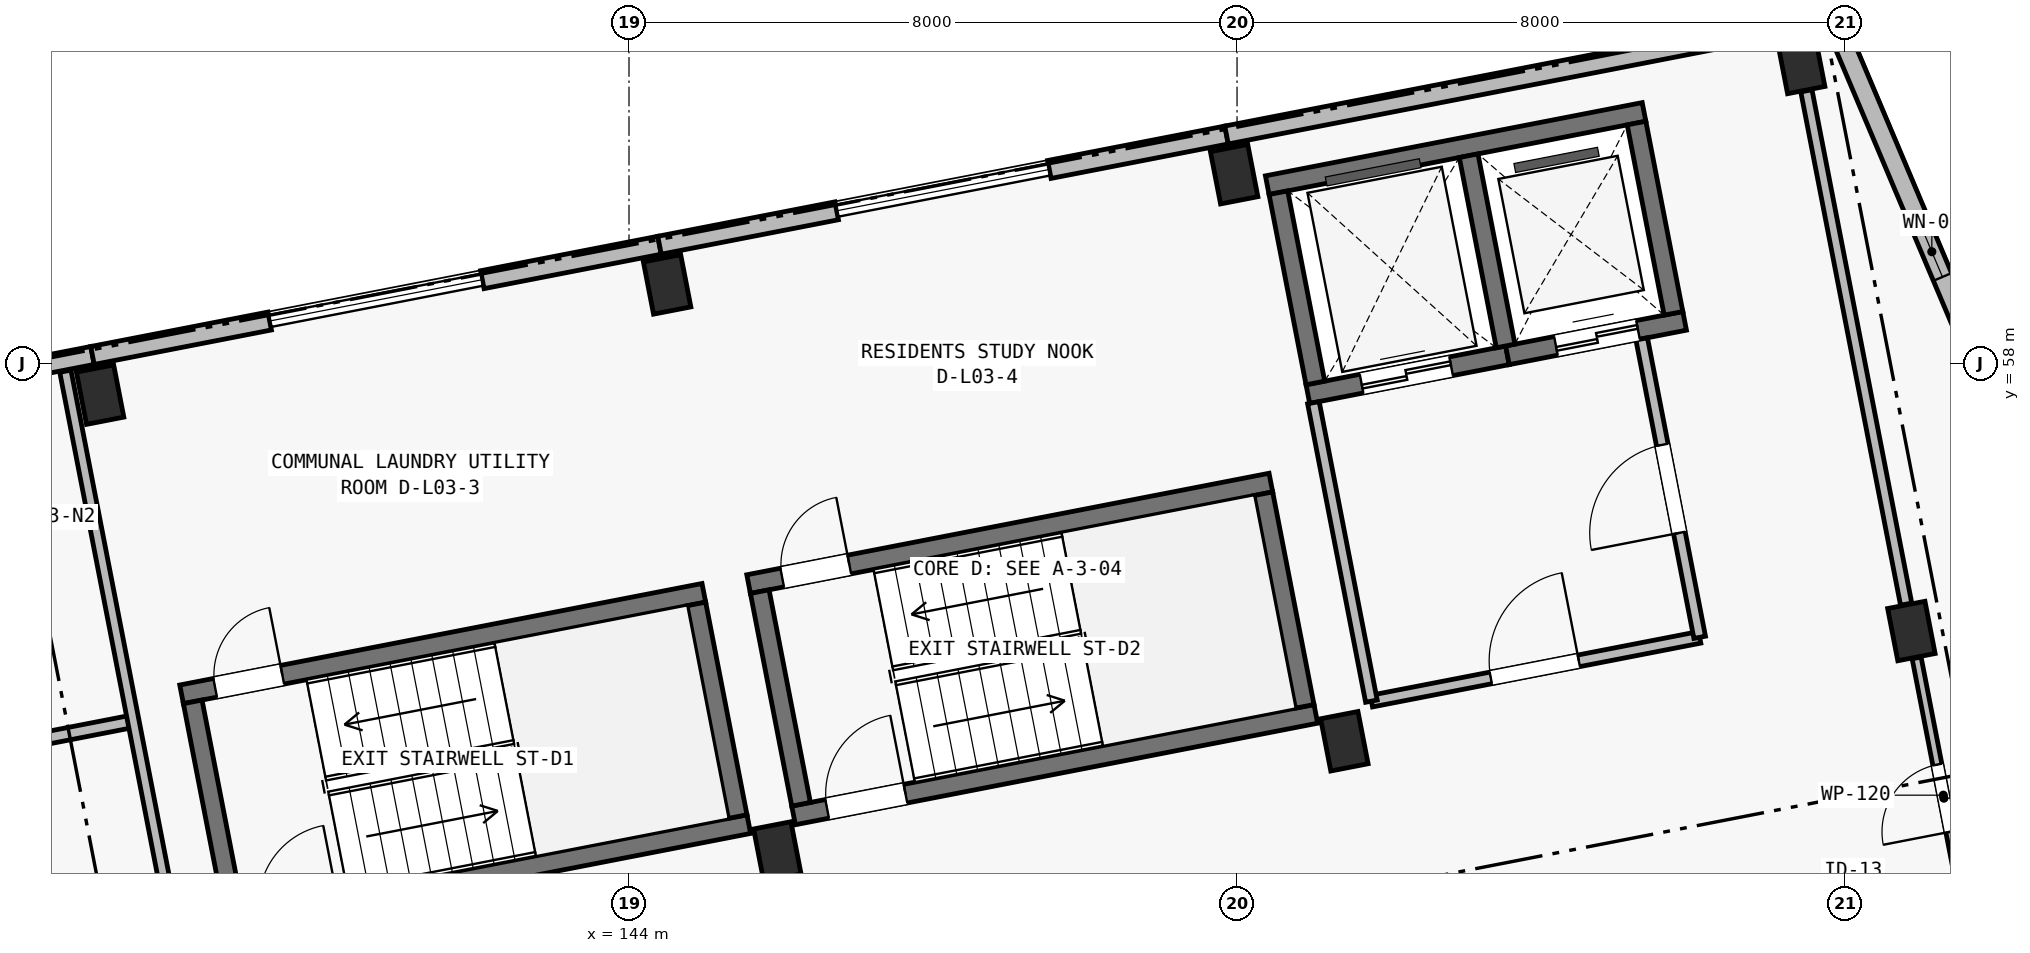
"""IFC4 building model, lengths in metres.
Left out: names, types, materials, properties, quantities, classifications, styles, units other than length and angle.
Written with IfcOpenShell. Run it as: python <this file> out.ifc"""

import sys

from ifc_helpers import new_model, si_unit, direction, frame, frame_2d, origin, origin_2d, place, context, subcontext, project, spatial, rectangle, extrude, element, fill, save


model = new_model("IFC4")
c1 = context("Model", 3, precision=1e-05, world=origin(), true_north=direction((0.0, 1.0)))
c2 = subcontext(c1, "Body", "Model", "MODEL_VIEW")
j1 = project(units=[si_unit("LENGTHUNIT", "METRE"), si_unit("PLANEANGLEUNIT", "RADIAN")], contexts=[c1])
p1 = place(None, origin())
s1 = spatial("IfcSite", under=j1, at=p1, CompositionType="ELEMENT")
p2 = place(p1, origin())
s2 = spatial("IfcBuilding", under=s1, at=p2, CompositionType="ELEMENT")
p3 = place(p2, frame((0.0, 0.0, 11.65)))
s3 = spatial("IfcBuildingStorey", under=s2, at=p3, CompositionType="ELEMENT", Elevation=11.65)
for number, where, z_axis, x_axis in (
    (1, (137.041, 57.59, 0.0), (0.0, 0.0, 1.0), (0.982, 0.191, 0.0)),
    (2, (145.952, 51.58, 0.0), (0.0, 0.0, 1.0), (0.982, 0.191, 0.0)),
    (3, (144.502, 59.041, 0.0), (0.0, 0.0, 1.0), (0.982, 0.191, 0.0)),
    (4, (153.412, 53.03, 0.0), (0.0, 0.0, 1.0), (0.982, 0.191, 0.0)),
    (5, (151.962, 60.491, 0.0), (0.0, 0.0, 1.0), (0.982, 0.191, 0.0)),
    (6, (160.873, 54.48, 0.0), (0.0, 0.0, 1.0), (0.982, 0.191, 0.0)),
    (7, (159.422, 61.941, 0.0), (0.0, 0.0, 1.0), (0.982, 0.191, 0.0)),
):
    element("IfcColumn", number, at=place(p3, frame(where, z_axis=z_axis, x_axis=x_axis)), inside=s3, PredefinedType="COLUMN", context=c2, shape_type="SweptSolid", body=[
        extrude(rectangle(XDim=0.5, YDim=0.7, at=origin_2d()), origin(), (0.0, 0.0, 1.0), 3.25),
    ])
p4 = place(p3, frame((152.397, 60.346, 0.0), z_axis=(0.0, 0.0, 1.0), x_axis=(0.981635261308, 0.190767433692, 0.0)))
e8 = element("IfcWall", 8, at=p4, inside=s3, PredefinedType="SHEAR", context=c2, shape_type="SweptSolid", body=[
    extrude(rectangle(XDim=5.05, YDim=0.25, at=frame_2d((2.525, 0.0))), origin(), (0.0, 0.0, 1.0), 3.25),
])
p5 = place(p3, frame((152.932, 57.598, 0.0), z_axis=(0.0, 0.0, 1.0), x_axis=(0.981636759622, 0.190759723627, 0.0)))
e9 = element("IfcWall", 9, at=p5, inside=s3, PredefinedType="SHEAR", context=c2, shape_type="SweptSolid", body=[
    extrude(rectangle(XDim=2.675, YDim=0.25, at=frame_2d((1.337, 0.0))), origin(), (0.0, 0.0, 1.0), 3.25),
])
p6 = place(p5, frame((0.72, 0.0, 0.0)))
e10 = element("IfcOpeningElement", 10, at=p6, cuts=e9, PredefinedType="OPENING", context=c2, shape_type="SweptSolid", body=[
    extrude(rectangle(XDim=1.2, YDim=2.2, at=frame_2d((0.6, 1.1))), frame((0.0, 0.14, 0.0), z_axis=(0.0, -1.0, 0.0), x_axis=(1.0, 0.0, 0.0)), (0.0, 0.0, 1.0), 0.28),
])
p7 = place(p3, frame((155.558, 58.108, 0.0), z_axis=(0.0, 0.0, 1.0), x_axis=(0.981633573872, 0.190776116556, 0.0)))
e11 = element("IfcWall", 11, at=p7, inside=s3, PredefinedType="SHEAR", context=c2, shape_type="SweptSolid", body=[
    extrude(rectangle(XDim=2.375, YDim=0.25, at=frame_2d((1.188, 0.0))), origin(), (0.0, 0.0, 1.0), 3.25),
])
p8 = place(p7, frame((0.65, 0.0, 0.0)))
e12 = element("IfcOpeningElement", 12, at=p8, cuts=e11, PredefinedType="OPENING", context=c2, shape_type="SweptSolid", body=[
    extrude(rectangle(XDim=1.1, YDim=2.15, at=frame_2d((0.55, 1.075))), frame((0.0, 0.14, 0.0), z_axis=(0.0, -1.0, 0.0), x_axis=(1.0, 0.0, 0.0)), (0.0, 0.0, 1.0), 0.28),
])
for number, where, z_axis, x_axis in (
    (13, (153.031, 57.744, 0.0), (0.0, 0.0, 1.0), (-0.191, 0.982, 0.0)),
    (14, (155.534, 58.231, 0.0), (0.0, 0.0, 1.0), (-0.191, 0.982, 0.0)),
    (15, (157.742, 58.66, 0.0), (0.0, 0.0, 1.0), (-0.191, 0.982, 0.0)),
):
    element("IfcWall", number, at=place(p3, frame(where, z_axis=z_axis, x_axis=x_axis)), inside=s3, PredefinedType="SHEAR", context=c2, shape_type="SweptSolid", body=[
        extrude(rectangle(XDim=2.55, YDim=0.25, at=frame_2d((1.275, 0.0))), origin(), (0.0, 0.0, 1.0), 3.25),
    ])
p9 = place(p3, frame((138.113, 53.647, 0.0), z_axis=(0.0, 0.0, 1.0), x_axis=(0.981626097708, 0.19081458094, 0.0)))
e16 = element("IfcWall", 16, at=p9, inside=s3, PredefinedType="SHEAR", context=c2, shape_type="SweptSolid", body=[
    extrude(rectangle(XDim=7.0, YDim=0.25, at=frame_2d((3.5, 0.0))), origin(), (0.0, 0.0, 1.0), 3.25),
])
p10 = place(p9, frame((0.45, 0.0, 0.0)))
e17 = element("IfcOpeningElement", 17, at=p10, cuts=e16, PredefinedType="OPENING", context=c2, shape_type="SweptSolid", body=[
    extrude(rectangle(XDim=0.9, YDim=2.1, at=frame_2d((0.45, 1.05))), frame((0.0, 0.14, 0.0), z_axis=(0.0, -1.0, 0.0), x_axis=(1.0, 0.0, 0.0)), (0.0, 0.0, 1.0), 0.28),
])
p11 = place(p3, frame((138.705, 50.604, 0.0), z_axis=(0.0, 0.0, 1.0), x_axis=(0.981626097708, 0.19081458094, 0.0)))
e18 = element("IfcWall", 18, at=p11, inside=s3, PredefinedType="SHEAR", context=c2, shape_type="SweptSolid", body=[
    extrude(rectangle(XDim=7.0, YDim=0.25, at=frame_2d((3.5, 0.0))), origin(), (0.0, 0.0, 1.0), 3.25),
])
p12 = place(p11, frame((0.45, 0.0, 0.0)))
e19 = element("IfcOpeningElement", 19, at=p12, cuts=e18, PredefinedType="OPENING", context=c2, shape_type="SweptSolid", body=[
    extrude(rectangle(XDim=1.05, YDim=2.15, at=frame_2d((0.525, 1.075))), frame((0.0, 0.14, 0.0), z_axis=(0.0, -1.0, 0.0), x_axis=(1.0, 0.0, 0.0)), (0.0, 0.0, 1.0), 0.28),
])
p13 = place(p3, frame((138.804, 50.751, 0.0), z_axis=(0.0, 0.0, 1.0), x_axis=(-0.190858194834, 0.981617618762, 0.0)))
e20 = element("IfcWall", 20, at=p13, inside=s3, PredefinedType="SHEAR", context=c2, shape_type="SweptSolid", body=[
    extrude(rectangle(XDim=2.85, YDim=0.25, at=frame_2d((1.425, 0.0))), origin(), (0.0, 0.0, 1.0), 3.25),
])
p14 = place(p3, frame((145.43, 52.039, 0.0), z_axis=(0.0, 0.0, 1.0), x_axis=(-0.190842147128, 0.981620738819, 0.0)))
e21 = element("IfcWall", 21, at=p14, inside=s3, PredefinedType="SHEAR", context=c2, shape_type="SweptSolid", body=[
    extrude(rectangle(XDim=2.85, YDim=0.25, at=frame_2d((1.425, 0.0))), origin(), (0.0, 0.0, 1.0), 3.25),
])
p15 = place(p3, frame((145.574, 55.098, 0.0), z_axis=(0.0, 0.0, 1.0), x_axis=(0.981626097708, 0.19081458094, 0.0)))
e22 = element("IfcWall", 22, at=p15, inside=s3, PredefinedType="SHEAR", context=c2, shape_type="SweptSolid", body=[
    extrude(rectangle(XDim=7.0, YDim=0.25, at=frame_2d((3.5, 0.0))), origin(), (0.0, 0.0, 1.0), 3.25),
])
p16 = place(p15, frame((0.45, 0.0, 0.0)))
e23 = element("IfcOpeningElement", 23, at=p16, cuts=e22, PredefinedType="OPENING", context=c2, shape_type="SweptSolid", body=[
    extrude(rectangle(XDim=0.9, YDim=2.1, at=frame_2d((0.45, 1.05))), frame((0.0, 0.14, 0.0), z_axis=(0.0, -1.0, 0.0), x_axis=(1.0, 0.0, 0.0)), (0.0, 0.0, 1.0), 0.28),
])
p17 = place(p3, frame((146.165, 52.054, 0.0), z_axis=(0.0, 0.0, 1.0), x_axis=(0.981627367538, 0.190808048312, 0.0)))
e24 = element("IfcWall", 24, at=p17, inside=s3, PredefinedType="SHEAR", context=c2, shape_type="SweptSolid", body=[
    extrude(rectangle(XDim=7.0, YDim=0.25, at=frame_2d((3.5, 0.0))), origin(), (0.0, 0.0, 1.0), 3.25),
])
p18 = place(p17, frame((0.45, 0.0, 0.0)))
e25 = element("IfcOpeningElement", 25, at=p18, cuts=e24, PredefinedType="OPENING", context=c2, shape_type="SweptSolid", body=[
    extrude(rectangle(XDim=1.05, YDim=2.15, at=frame_2d((0.525, 1.075))), frame((0.0, 0.14, 0.0), z_axis=(0.0, -1.0, 0.0), x_axis=(1.0, 0.0, 0.0)), (0.0, 0.0, 1.0), 0.28),
])
for number, where, z_axis, x_axis in (
    (26, (146.264, 52.201, 0.0), (0.0, 0.0, 1.0), (-0.191, 0.982, 0.0)),
    (27, (152.89, 53.489, 0.0), (0.0, 0.0, 1.0), (-0.191, 0.982, 0.0)),
):
    element("IfcWall", number, at=place(p3, frame(where, z_axis=z_axis, x_axis=x_axis)), inside=s3, PredefinedType="SHEAR", context=c2, shape_type="SweptSolid", body=[
        extrude(rectangle(XDim=2.85, YDim=0.25, at=frame_2d((1.425, 0.0))), origin(), (0.0, 0.0, 1.0), 3.25),
    ])
p19 = place(p3, frame((129.481, 56.656, 0.0), z_axis=(0.0, 0.0, 1.0), x_axis=(0.981626422232, 0.190812911449, 0.0)))
e28 = element("IfcWall", 28, at=p19, inside=s3, PredefinedType="SOLIDWALL", context=c2, shape_type="SweptSolid", body=[
    extrude(rectangle(XDim=7.6, YDim=0.24, at=frame_2d((3.8, 0.0))), origin(), (0.0, 0.0, 1.0), 3.0),
])
p20 = place(p19, frame((1.384, 0.0, 0.5)))
e29 = element("IfcOpeningElement", 29, at=p20, cuts=e28, PredefinedType="OPENING", context=c2, shape_type="SweptSolid", body=[
    extrude(rectangle(XDim=0.72, YDim=2.16, at=frame_2d((0.36, 1.08))), frame((0.0, 0.135, 0.0), z_axis=(0.0, -1.0, 0.0), x_axis=(1.0, 0.0, 0.0)), (0.0, 0.0, 1.0), 0.27),
])
p21 = place(p19, frame((5.873, 0.0, 0.44)))
e30 = element("IfcOpeningElement", 30, at=p21, cuts=e28, PredefinedType="OPENING", context=c2, shape_type="SweptSolid", body=[
    extrude(rectangle(XDim=0.8, YDim=2.3, at=frame_2d((0.4, 1.15))), frame((0.0, 0.135, 0.0), z_axis=(0.0, -1.0, 0.0), x_axis=(1.0, 0.0, 0.0)), (0.0, 0.0, 1.0), 0.27),
])
for number, where, z_axis, x_axis in (
    (31, (136.941, 58.106, 0.0), (0.0, 0.0, 1.0), (0.982, 0.191, 0.0)),
    (32, (142.07, 59.103, 0.0), (0.0, 0.0, 1.0), (0.982, 0.191, 0.0)),
):
    element("IfcWall", number, at=place(p3, frame(where, z_axis=z_axis, x_axis=x_axis)), inside=s3, PredefinedType="SOLIDWALL", context=c2, shape_type="SweptSolid", body=[
        extrude(rectangle(XDim=2.375, YDim=0.24, at=frame_2d((1.188, 0.0))), origin(), (0.0, 0.0, 1.0), 3.0),
    ])
p22 = place(p3, frame((144.401, 59.556, 0.0), z_axis=(0.0, 0.0, 1.0), x_axis=(0.981633573872, 0.190776116556, 0.0)))
e33 = element("IfcWall", 33, at=p22, inside=s3, PredefinedType="SOLIDWALL", context=c2, shape_type="SweptSolid", body=[
    extrude(rectangle(XDim=2.375, YDim=0.24, at=frame_2d((1.188, 0.0))), origin(), (0.0, 0.0, 1.0), 3.0),
])
p23 = place(p3, frame((149.531, 60.553, 0.0), z_axis=(0.0, 0.0, 1.0), x_axis=(0.98161057432, 0.190894422087, 0.0)))
e34 = element("IfcWall", 34, at=p23, inside=s3, PredefinedType="SOLIDWALL", context=c2, shape_type="SweptSolid", body=[
    extrude(rectangle(XDim=2.375, YDim=0.24, at=frame_2d((1.188, 0.0))), origin(), (0.0, 0.0, 1.0), 3.0),
])
p24 = place(p3, frame((151.862, 61.006, 0.0), z_axis=(0.0, 0.0, 1.0), x_axis=(0.981627273155, 0.190808533872, 0.0)))
e35 = element("IfcWall", 35, at=p24, inside=s3, PredefinedType="SOLIDWALL", context=c2, shape_type="SweptSolid", body=[
    extrude(rectangle(XDim=8.125, YDim=0.24, at=frame_2d((4.062, 0.0))), origin(), (0.0, 0.0, 1.0), 3.0),
])
p25 = place(p24, frame((6.525, 0.0, 0.45)))
e36 = element("IfcOpeningElement", 36, at=p25, cuts=e35, PredefinedType="OPENING", context=c2, shape_type="SweptSolid", body=[
    extrude(rectangle(XDim=0.75, YDim=2.32, at=frame_2d((0.375, 1.16))), frame((0.0, 0.135, 0.0), z_axis=(0.0, -1.0, 0.0), x_axis=(1.0, 0.0, 0.0)), (0.0, 0.0, 1.0), 0.27),
])
p26 = place(p3, frame((159.837, 62.556, 0.0), z_axis=(0.0, 0.0, 1.0), x_axis=(0.389225507936, -0.921142499276, 0.0)))
e37 = element("IfcWall", 37, at=p26, inside=s3, PredefinedType="SOLIDWALL", context=c2, shape_type="SweptSolid", body=[
    extrude(rectangle(XDim=17.91, YDim=0.26, at=frame_2d((8.955, 0.0))), origin(), (0.0, 0.0, 1.0), 3.0),
])
p27 = place(p26, frame((2.99, 0.0, 0.52)))
e38 = element("IfcOpeningElement", 38, at=p27, cuts=e37, PredefinedType="OPENING", context=c2, shape_type="SweptSolid", body=[
    extrude(rectangle(XDim=0.72, YDim=2.16, at=frame_2d((0.36, 1.08))), frame((0.0, 0.145, 0.0), z_axis=(0.0, -1.0, 0.0), x_axis=(1.0, 0.0, 0.0)), (0.0, 0.0, 1.0), 0.29),
])
p28 = place(p26, frame((14.42, 0.0, 0.45)))
e39 = element("IfcOpeningElement", 39, at=p28, cuts=e37, PredefinedType="OPENING", context=c2, shape_type="SweptSolid", body=[
    extrude(rectangle(XDim=0.86, YDim=2.36, at=frame_2d((0.43, 1.18))), frame((0.0, 0.145, 0.0), z_axis=(0.0, -1.0, 0.0), x_axis=(1.0, 0.0, 0.0)), (0.0, 0.0, 1.0), 0.29),
])
p29 = place(p3, frame((153.768, 53.558, 0.0), z_axis=(0.0, 0.0, 1.0), x_axis=(0.981624918225, 0.190820648566, 0.0)))
e40 = element("IfcWall", 40, at=p29, inside=s3, PredefinedType="PARTITIONING", context=c2, shape_type="SweptSolid", body=[
    extrude(rectangle(XDim=4.4, YDim=0.155, at=frame_2d((2.2, 0.0))), origin(), (0.0, 0.0, 1.0), 2.97),
])
p30 = place(p29, frame((1.6, 0.0, 0.0)))
e41 = element("IfcOpeningElement", 41, at=p30, cuts=e40, PredefinedType="OPENING", context=c2, shape_type="SweptSolid", body=[
    extrude(rectangle(XDim=1.18, YDim=2.15, at=frame_2d((0.59, 1.075))), frame((0.0, 0.093, 0.0), z_axis=(0.0, -1.0, 0.0), x_axis=(1.0, 0.0, 0.0)), (0.0, 0.0, 1.0), 0.185),
])
p31 = place(p3, frame((153.768, 53.558, 0.0), z_axis=(0.0, 0.0, 1.0), x_axis=(-0.19085495634, 0.981618248425, 0.0)))
e42 = element("IfcWall", 42, at=p31, inside=s3, PredefinedType="PARTITIONING", context=c2, shape_type="SweptSolid", body=[
    extrude(rectangle(XDim=4.0, YDim=0.155, at=frame_2d((2.0, 0.0))), origin(), (0.0, 0.0, 1.0), 2.97),
])
p32 = place(p3, frame((158.087, 54.397, 0.0), z_axis=(0.0, 0.0, 1.0), x_axis=(-0.190796144009, 0.981629681413, 0.0)))
e43 = element("IfcWall", 43, at=p32, inside=s3, PredefinedType="PARTITIONING", context=c2, shape_type="SweptSolid", body=[
    extrude(rectangle(XDim=4.0, YDim=0.155, at=frame_2d((2.0, 0.0))), origin(), (0.0, 0.0, 1.0), 2.97),
])
p33 = place(p32, frame((1.4, 0.0, 0.0)))
e44 = element("IfcOpeningElement", 44, at=p33, cuts=e43, PredefinedType="OPENING", context=c2, shape_type="SweptSolid", body=[
    extrude(rectangle(XDim=1.18, YDim=2.15, at=frame_2d((0.59, 1.075))), frame((0.0, 0.093, 0.0), z_axis=(0.0, -1.0, 0.0), x_axis=(1.0, 0.0, 0.0)), (0.0, 0.0, 1.0), 0.185),
])
p34 = place(p3, frame((161.643, 50.515, 0.0), z_axis=(0.0, 0.0, 1.0), x_axis=(-0.190805731561, 0.981627817864, 0.0)))
e45 = element("IfcWall", 45, at=p34, inside=s3, PredefinedType="PARTITIONING", context=c2, shape_type="SweptSolid", body=[
    extrude(rectangle(XDim=3.68, YDim=0.12, at=frame_2d((1.84, 0.0))), origin(), (0.0, 0.0, 1.0), 2.5),
])
p35 = place(p34, frame((1.35, 0.0, 0.0)))
e46 = element("IfcOpeningElement", 46, at=p35, cuts=e45, PredefinedType="OPENING", context=c2, shape_type="SweptSolid", body=[
    extrude(rectangle(XDim=0.9, YDim=2.1, at=frame_2d((0.45, 1.05))), frame((0.0, 0.075, 0.0), z_axis=(0.0, -1.0, 0.0), x_axis=(1.0, 0.0, 0.0)), (0.0, 0.0, 1.0), 0.15),
])
p36 = place(p3, frame((160.804, 54.834, 0.0), z_axis=(0.0, 0.0, 1.0), x_axis=(-0.190804123115, 0.981628130507, 0.0)))
e47 = element("IfcWall", 47, at=p36, inside=s3, PredefinedType="PARTITIONING", context=c2, shape_type="SweptSolid", body=[
    extrude(rectangle(XDim=6.88, YDim=0.15, at=frame_2d((3.44, 0.0))), origin(), (0.0, 0.0, 1.0), 2.5),
])
p37 = place(p3, frame((134.132, 52.644, 0.0), z_axis=(0.0, 0.0, 1.0), x_axis=(0.981629173664, 0.190798756314, 0.0)))
e48 = element("IfcWall", 48, at=p37, inside=s3, PredefinedType="PLUMBINGWALL", context=c2, shape_type="SweptSolid", body=[
    extrude(rectangle(XDim=3.41, YDim=0.165, at=frame_2d((1.705, 0.0))), origin(), (0.0, 0.0, 1.0), 2.97),
])
p38 = place(p37, frame((1.295, 0.0, 0.0)))
e49 = element("IfcOpeningElement", 49, at=p38, cuts=e48, PredefinedType="OPENING", context=c2, shape_type="SweptSolid", body=[
    extrude(rectangle(XDim=0.82, YDim=2.08, at=frame_2d((0.41, 1.04))), frame((0.0, 0.097, 0.0), z_axis=(0.0, -1.0, 0.0), x_axis=(1.0, 0.0, 0.0)), (0.0, 0.0, 1.0), 0.195),
])
p39 = place(p3, frame((138.467, 48.21, 0.0), z_axis=(0.0, 0.0, 1.0), x_axis=(-0.190814044018, 0.981626202078, 0.0)))
e50 = element("IfcWall", 50, at=p39, inside=s3, PredefinedType="PARTITIONING", context=c2, shape_type="SweptSolid", body=[
    extrude(rectangle(XDim=9.87, YDim=0.15, at=frame_2d((4.935, 0.0))), origin(), (0.0, 0.0, 1.0), 2.97),
])
p40 = place(p27, origin())
e51 = element("IfcWindow", 51, at=p40, inside=s3, PartitioningType="SINGLE_PANEL", PredefinedType="WINDOW", context=c2, shape_type="SweptSolid", body=[
    extrude(rectangle(XDim=0.72, YDim=2.16, at=frame_2d((0.36, 1.08))), frame((0.0, 0.03, 0.0), z_axis=(0.0, -1.0, 0.0), x_axis=(1.0, 0.0, 0.0)), (0.0, 0.0, 1.0), 0.06),
])
fill(e38, e51)
p41 = place(p30, origin())
e52 = element("IfcDoor", 52, at=p41, inside=s3, OperationType="SINGLE_SWING_RIGHT", PredefinedType="DOOR", context=c2, shape_type="SweptSolid", body=[
    extrude(rectangle(XDim=1.18, YDim=2.15, at=frame_2d((0.59, 1.075))), frame((0.0, 0.025, 0.0), z_axis=(0.0, -1.0, 0.0), x_axis=(1.0, 0.0, 0.0)), (0.0, 0.0, 1.0), 0.05),
])
fill(e41, e52)
p42 = place(p33, origin())
e53 = element("IfcDoor", 53, at=p42, inside=s3, OperationType="SINGLE_SWING_LEFT", PredefinedType="DOOR", context=c2, shape_type="SweptSolid", body=[
    extrude(rectangle(XDim=1.18, YDim=2.15, at=frame_2d((0.59, 1.075))), frame((0.0, 0.025, 0.0), z_axis=(0.0, -1.0, 0.0), x_axis=(1.0, 0.0, 0.0)), (0.0, 0.0, 1.0), 0.05),
])
fill(e44, e53)
p43 = place(p35, origin())
e54 = element("IfcDoor", 54, at=p43, inside=s3, OperationType="SINGLE_SWING_LEFT", PredefinedType="DOOR", context=c2, shape_type="SweptSolid", body=[
    extrude(rectangle(XDim=0.9, YDim=2.1, at=frame_2d((0.45, 1.05))), frame((0.0, 0.025, 0.0), z_axis=(0.0, -1.0, 0.0), x_axis=(1.0, 0.0, 0.0)), (0.0, 0.0, 1.0), 0.05),
])
fill(e46, e54)
p44 = place(p10, origin())
e55 = element("IfcDoor", 55, at=p44, inside=s3, OperationType="SINGLE_SWING_RIGHT", PredefinedType="DOOR", context=c2, shape_type="SweptSolid", body=[
    extrude(rectangle(XDim=0.9, YDim=2.1, at=frame_2d((0.45, 1.05))), frame((0.0, 0.025, 0.0), z_axis=(0.0, -1.0, 0.0), x_axis=(1.0, 0.0, 0.0)), (0.0, 0.0, 1.0), 0.05),
])
fill(e17, e55)
p45 = place(p18, origin())
e56 = element("IfcDoor", 56, at=p45, inside=s3, OperationType="SINGLE_SWING_RIGHT", PredefinedType="DOOR", context=c2, shape_type="SweptSolid", body=[
    extrude(rectangle(XDim=1.05, YDim=2.15, at=frame_2d((0.525, 1.075))), frame((0.0, 0.025, 0.0), z_axis=(0.0, -1.0, 0.0), x_axis=(1.0, 0.0, 0.0)), (0.0, 0.0, 1.0), 0.05),
])
fill(e25, e56)
p46 = place(p16, origin())
e57 = element("IfcDoor", 57, at=p46, inside=s3, OperationType="SINGLE_SWING_RIGHT", PredefinedType="DOOR", context=c2, shape_type="SweptSolid", body=[
    extrude(rectangle(XDim=0.9, YDim=2.1, at=frame_2d((0.45, 1.05))), frame((0.0, 0.025, 0.0), z_axis=(0.0, -1.0, 0.0), x_axis=(1.0, 0.0, 0.0)), (0.0, 0.0, 1.0), 0.05),
])
fill(e23, e57)
p47 = place(p6, origin())
e58 = element("IfcDoor", 58, at=p47, inside=s3, OperationType="DOUBLE_DOOR_SLIDING", PredefinedType="DOOR", context=c2, shape_type="SweptSolid", body=[
    extrude(rectangle(XDim=1.2, YDim=2.2, at=frame_2d((0.6, 1.1))), frame((0.0, 0.025, 0.0), z_axis=(0.0, -1.0, 0.0), x_axis=(1.0, 0.0, 0.0)), (0.0, 0.0, 1.0), 0.05),
])
fill(e10, e58)
p48 = place(p8, origin())
e59 = element("IfcDoor", 59, at=p48, inside=s3, OperationType="DOUBLE_DOOR_SLIDING", PredefinedType="DOOR", context=c2, shape_type="SweptSolid", body=[
    extrude(rectangle(XDim=1.1, YDim=2.15, at=frame_2d((0.55, 1.075))), frame((0.0, 0.025, 0.0), z_axis=(0.0, -1.0, 0.0), x_axis=(1.0, 0.0, 0.0)), (0.0, 0.0, 1.0), 0.05),
])
fill(e12, e59)
save(model, sys.argv[1])
